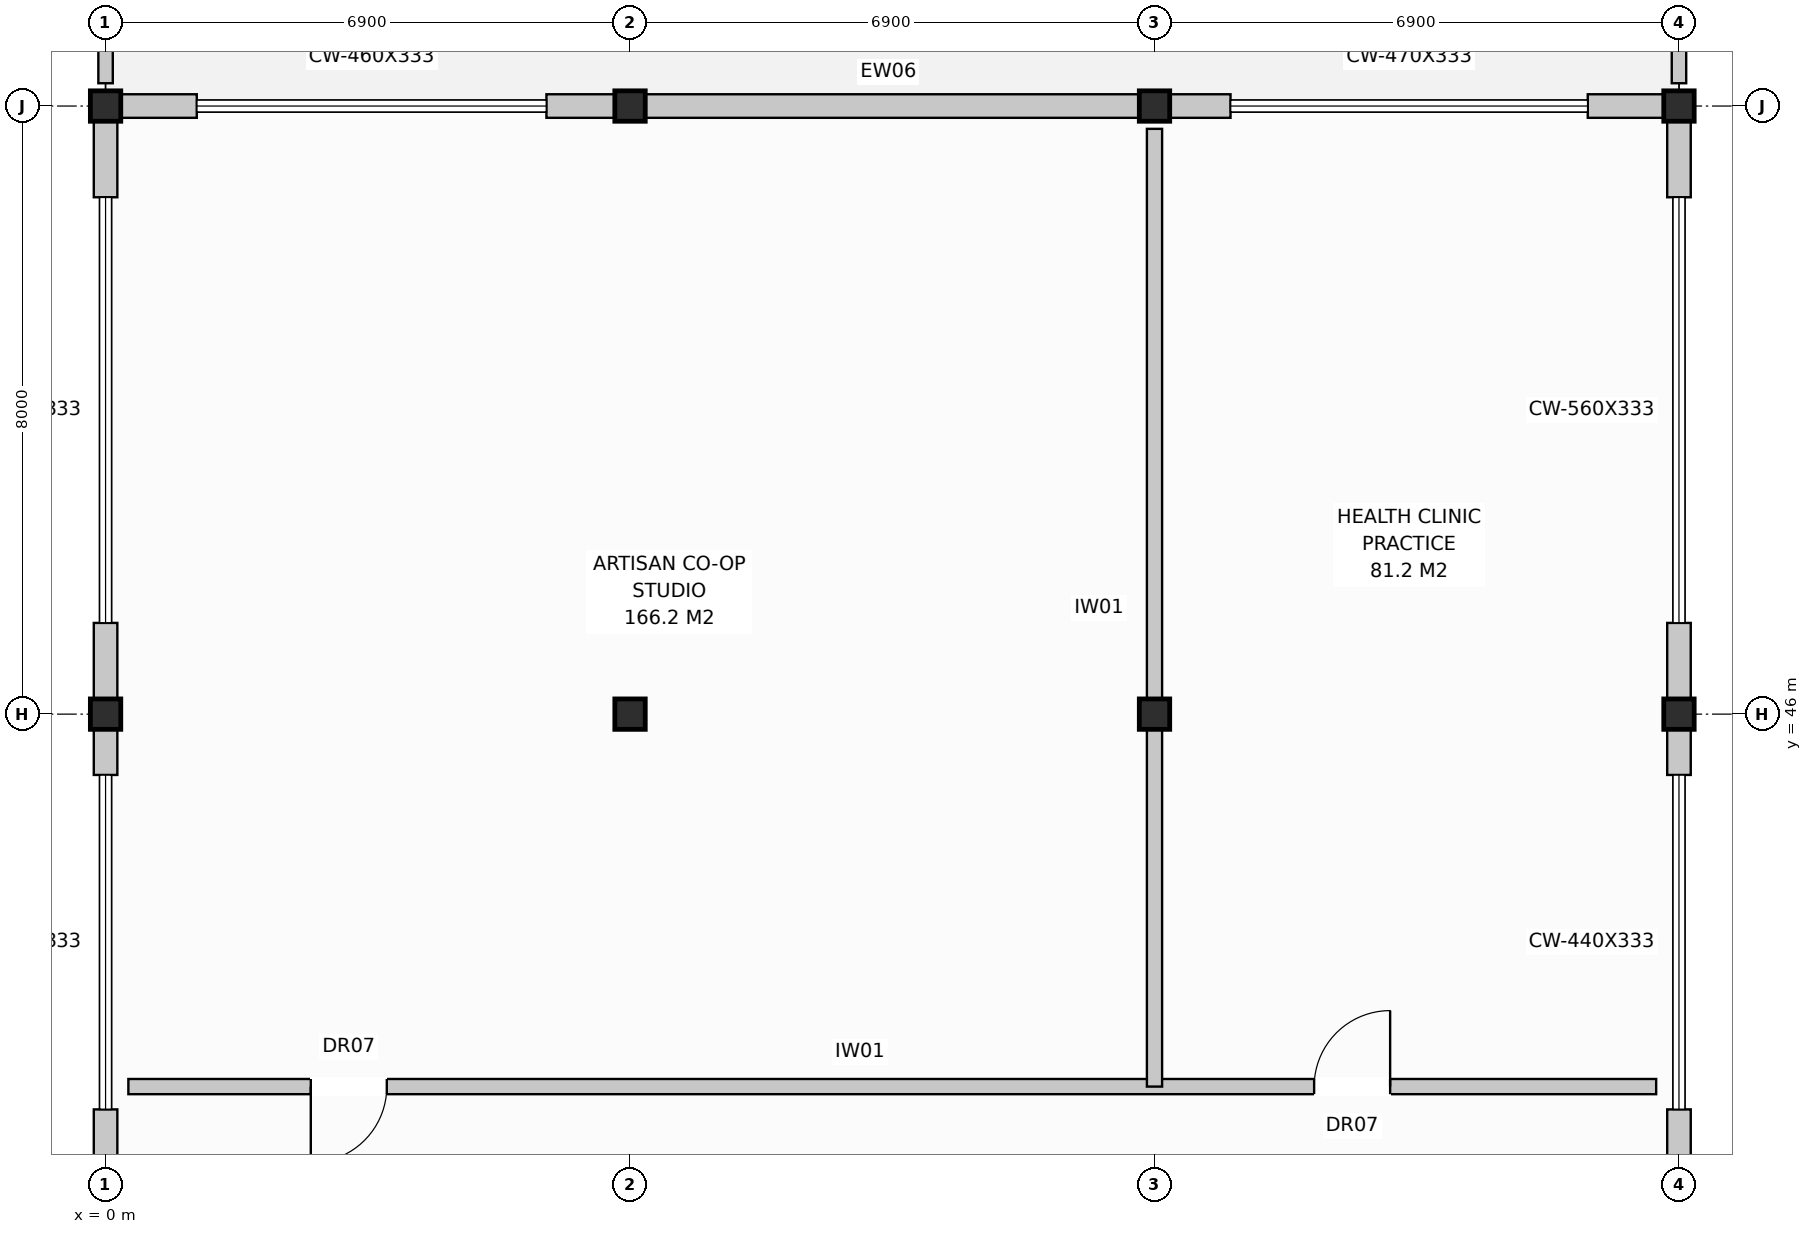
"""IFC4 building model, lengths in metres.
Left out: names, types, materials, properties, quantities, classifications, styles, units other than length and angle.
Written with IfcOpenShell. Run it as: python <this file> out.ifc"""

import sys

from ifc_helpers import new_model, si_unit, direction, frame, frame_2d, origin, origin_with_axes, origin_2d, place, context, subcontext, project, spatial, rectangle, extrude, element, fill, save


model = new_model("IFC4")
c1 = context("Model", 3, precision=1e-05, world=origin(), true_north=direction((0.0, 1.0)))
c2 = subcontext(c1, "Body", "Model", "MODEL_VIEW")
j1 = project(units=[si_unit("LENGTHUNIT", "METRE"), si_unit("PLANEANGLEUNIT", "RADIAN")], contexts=[c1])
p1 = place(None, origin())
s1 = spatial("IfcSite", under=j1, at=p1, CompositionType="ELEMENT")
p2 = place(p1, origin())
s2 = spatial("IfcBuilding", under=s1, at=p2, CompositionType="ELEMENT")
p3 = place(p2, frame((0.0, 0.0, 4.4)))
s3 = spatial("IfcBuildingStorey", under=s2, at=p3, CompositionType="ELEMENT", Elevation=4.4)
for number, where, z_axis, x_axis in (
    (1, (0.0, 46.0, 0.0), (0.0, 0.0, 1.0), (1.0, 0.0, 0.0)),
    (2, (0.0, 54.0, 0.0), (0.0, 0.0, 1.0), (1.0, 0.0, 0.0)),
    (3, (6.9, 46.0, 0.0), (0.0, 0.0, 1.0), (1.0, 0.0, 0.0)),
    (4, (6.9, 54.0, 0.0), (0.0, 0.0, 1.0), (1.0, 0.0, 0.0)),
    (5, (13.8, 46.0, 0.0), (0.0, 0.0, 1.0), (1.0, 0.0, 0.0)),
    (6, (13.8, 54.0, 0.0), (0.0, 0.0, 1.0), (1.0, 0.0, 0.0)),
    (7, (20.7, 46.0, 0.0), (0.0, 0.0, 1.0), (1.0, 0.0, 0.0)),
    (8, (20.7, 54.0, 0.0), (0.0, 0.0, 1.0), (1.0, 0.0, 0.0)),
):
    element("IfcColumn", number, at=place(p3, frame(where, z_axis=z_axis, x_axis=x_axis)), inside=s3, PredefinedType="COLUMN", context=c2, shape_type="SweptSolid", body=[
        extrude(rectangle(XDim=0.4, YDim=0.4, at=origin_2d()), origin(), (0.0, 0.0, 1.0), 3.6),
    ])
p4 = place(p3, frame((0.0, 36.4, 0.0), z_axis=(0.0, 0.0, 1.0), x_axis=(0.0, 1.0, 0.0)))
e9 = element("IfcWall", 9, at=p4, inside=s3, PredefinedType="STANDARD", context=c2, shape_type="SweptSolid", body=[
    extrude(rectangle(XDim=4.4, YDim=0.31, at=frame_2d((2.2, 0.0))), origin(), (0.0, 0.0, 1.0), 2.96),
])
p5 = place(p3, frame((0.0, 45.2, 0.0), z_axis=(0.0, 0.0, 1.0), x_axis=(0.0, 1.0, 0.0)))
e10 = element("IfcWall", 10, at=p5, inside=s3, PredefinedType="STANDARD", context=c2, shape_type="SweptSolid", body=[
    extrude(rectangle(XDim=2.0, YDim=0.31, at=frame_2d((1.0, 0.0))), origin(), (0.0, 0.0, 1.0), 3.33),
])
p6 = place(p3, frame((0.0, 52.8, 0.0), z_axis=(0.0, 0.0, 1.0), x_axis=(0.0, 1.0, 0.0)))
e11 = element("IfcWall", 11, at=p6, inside=s3, PredefinedType="STANDARD", context=c2, shape_type="SweptSolid", body=[
    extrude(rectangle(XDim=1.2, YDim=0.31, at=frame_2d((0.6, 0.0))), origin(), (0.0, 0.0, 1.0), 3.33),
])
p7 = place(p3, frame((20.7, 36.4, 0.0), z_axis=(0.0, 0.0, 1.0), x_axis=(0.0, 1.0, 0.0)))
e12 = element("IfcWall", 12, at=p7, inside=s3, PredefinedType="STANDARD", context=c2, shape_type="SweptSolid", body=[
    extrude(rectangle(XDim=4.4, YDim=0.31, at=frame_2d((2.2, 0.0))), origin(), (0.0, 0.0, 1.0), 2.96),
])
p8 = place(p3, frame((20.7, 45.2, 0.0), z_axis=(0.0, 0.0, 1.0), x_axis=(0.0, 1.0, 0.0)))
e13 = element("IfcWall", 13, at=p8, inside=s3, PredefinedType="STANDARD", context=c2, shape_type="SweptSolid", body=[
    extrude(rectangle(XDim=2.0, YDim=0.31, at=frame_2d((1.0, 0.0))), origin(), (0.0, 0.0, 1.0), 3.33),
])
for number, where, z_axis, x_axis in (
    (14, (20.7, 52.8, 0.0), (0.0, 0.0, 1.0), (0.0, 1.0, 0.0)),
    (15, (0.0, 54.0, 0.0), (0.0, 0.0, 1.0), (1.0, 0.0, 0.0)),
):
    element("IfcWall", number, at=place(p3, frame(where, z_axis=z_axis, x_axis=x_axis)), inside=s3, PredefinedType="STANDARD", context=c2, shape_type="SweptSolid", body=[
        extrude(rectangle(XDim=1.2, YDim=0.31, at=frame_2d((0.6, 0.0))), origin(), (0.0, 0.0, 1.0), 3.33),
    ])
p9 = place(p3, frame((5.8, 54.0, 0.0), z_axis=(0.0, 0.0, 1.0), x_axis=(1.0, 0.0, 0.0)))
e16 = element("IfcWall", 16, at=p9, inside=s3, PredefinedType="STANDARD", context=c2, shape_type="SweptSolid", body=[
    extrude(rectangle(XDim=9.0, YDim=0.31, at=frame_2d((4.5, 0.0))), origin(), (0.0, 0.0, 1.0), 3.33),
])
p10 = place(p3, frame((19.5, 54.0, 0.0), z_axis=(0.0, 0.0, 1.0), x_axis=(1.0, 0.0, 0.0)))
e17 = element("IfcWall", 17, at=p10, inside=s3, PredefinedType="STANDARD", context=c2, shape_type="SweptSolid", body=[
    extrude(rectangle(XDim=1.2, YDim=0.31, at=frame_2d((0.6, 0.0))), origin(), (0.0, 0.0, 1.0), 3.33),
])
for number, where, z_axis, x_axis in (
    (18, (0.0, 54.3, 0.55), (0.0, 0.0, 1.0), (0.0, 1.0, 0.0)),
    (19, (20.7, 54.3, 0.55), (0.0, 0.0, 1.0), (0.0, 1.0, 0.0)),
):
    element("IfcWall", number, at=place(p3, frame(where, z_axis=z_axis, x_axis=x_axis)), inside=s3, PredefinedType="PARAPET", context=c2, shape_type="SweptSolid", body=[
        extrude(rectangle(XDim=7.4, YDim=0.19, at=frame_2d((3.7, 0.0))), origin(), (0.0, 0.0, 1.0), 0.6),
    ])
p11 = place(p3, frame((0.3, 41.1, 0.0), z_axis=(0.0, 0.0, 1.0), x_axis=(1.0, 0.0, 0.0)))
e20 = element("IfcWall", 20, at=p11, inside=s3, PredefinedType="PARTITIONING", context=c2, shape_type="SweptSolid", body=[
    extrude(rectangle(XDim=20.1, YDim=0.2, at=frame_2d((10.05, 0.0))), origin(), (0.0, 0.0, 1.0), 3.33),
])
p12 = place(p11, frame((2.4, 0.0, 0.0)))
e21 = element("IfcOpeningElement", 21, at=p12, cuts=e20, PredefinedType="OPENING", context=c2, shape_type="SweptSolid", body=[
    extrude(rectangle(XDim=1.0, YDim=2.15, at=frame_2d((0.5, 1.075))), frame((0.0, 0.112, 0.0), z_axis=(0.0, -1.0, 0.0), x_axis=(1.0, 0.0, 0.0)), (0.0, 0.0, 1.0), 0.224),
])
p13 = place(p11, frame((15.6, 0.0, 0.0)))
e22 = element("IfcOpeningElement", 22, at=p13, cuts=e20, PredefinedType="OPENING", context=c2, shape_type="SweptSolid", body=[
    extrude(rectangle(XDim=1.0, YDim=2.15, at=frame_2d((0.5, 1.075))), frame((0.0, 0.112, 0.0), z_axis=(0.0, -1.0, 0.0), x_axis=(1.0, 0.0, 0.0)), (0.0, 0.0, 1.0), 0.224),
])
p14 = place(p3, frame((13.8, 41.1, 0.0), z_axis=(0.0, 0.0, 1.0), x_axis=(0.0, 1.0, 0.0)))
e23 = element("IfcWall", 23, at=p14, inside=s3, PredefinedType="PARTITIONING", context=c2, shape_type="SweptSolid", body=[
    extrude(rectangle(XDim=12.6, YDim=0.2, at=frame_2d((6.3, 0.0))), origin(), (0.0, 0.0, 1.0), 3.33),
])
p15 = place(p12, frame((1.0, 0.0, 0.0), z_axis=(0.0, 0.0, 1.0), x_axis=(-1.0, 0.0, 0.0)))
e24 = element("IfcDoor", 24, at=p15, inside=s3, OperationType="SINGLE_SWING_LEFT", PredefinedType="DOOR", context=c2, shape_type="SweptSolid", body=[
    extrude(rectangle(XDim=1.0, YDim=2.15, at=frame_2d((0.5, 1.075))), frame((0.0, 0.025, 0.0), z_axis=(0.0, -1.0, 0.0), x_axis=(1.0, 0.0, 0.0)), (0.0, 0.0, 1.0), 0.05),
])
fill(e21, e24)
p16 = place(p13, origin_with_axes())
e25 = element("IfcDoor", 25, at=p16, inside=s3, OperationType="SINGLE_SWING_RIGHT", PredefinedType="DOOR", context=c2, shape_type="SweptSolid", body=[
    extrude(rectangle(XDim=1.0, YDim=2.15, at=frame_2d((0.5, 1.075))), frame((0.0, 0.025, 0.0), z_axis=(0.0, -1.0, 0.0), x_axis=(1.0, 0.0, 0.0)), (0.0, 0.0, 1.0), 0.05),
])
fill(e22, e25)
save(model, sys.argv[1])
